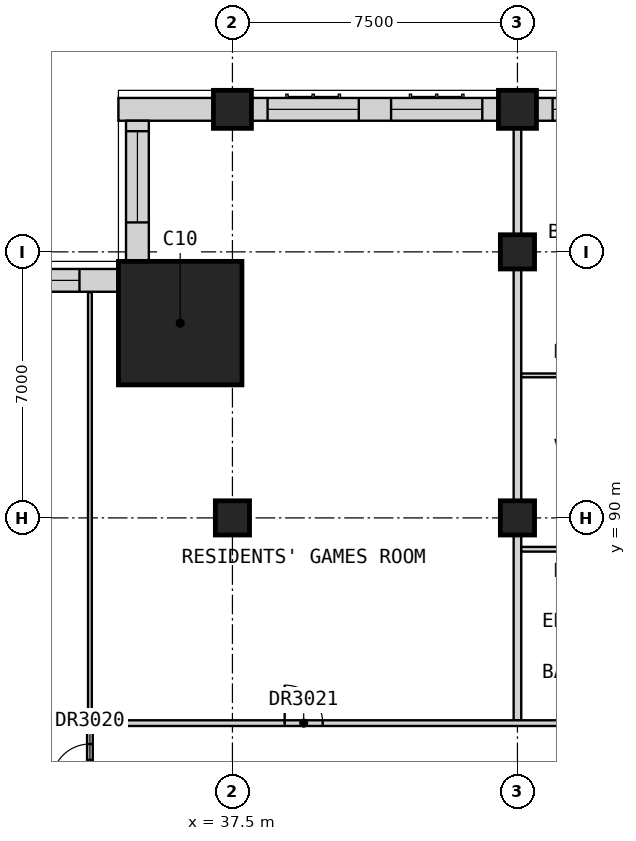
"""IFC4 building model, lengths in metres.
Left out: names, types, materials, properties, quantities, classifications, styles, units other than length and angle.
Written with IfcOpenShell. Run it as: python <this file> out.ifc"""

import sys

from ifc_helpers import new_model, si_unit, direction, frame, frame_2d, origin, origin_2d, place, context, subcontext, project, spatial, rectangle, extrude, element, fill, save


model = new_model("IFC4")
c1 = context("Model", 3, precision=1e-05, world=origin(), true_north=direction((0.0, 1.0)))
c2 = subcontext(c1, "Body", "Model", "MODEL_VIEW")
j1 = project(units=[si_unit("LENGTHUNIT", "METRE"), si_unit("PLANEANGLEUNIT", "RADIAN")], contexts=[c1])
p1 = place(None, origin())
s1 = spatial("IfcSite", under=j1, at=p1, CompositionType="ELEMENT")
p2 = place(p1, origin())
s2 = spatial("IfcBuilding", under=s1, at=p2, CompositionType="ELEMENT")
p3 = place(p2, frame((0.0, 0.0, 186.2)))
s3 = spatial("IfcBuildingStorey", under=s2, at=p3, CompositionType="ELEMENT", Elevation=186.2)
for number, where, z_axis, x_axis in (
    (1, (37.5, 100.75, 0.0), (0.0, 0.0, 1.0), (1.0, 0.0, 0.0)),
    (2, (45.0, 100.75, 0.0), (0.0, 0.0, 1.0), (1.0, 0.0, 0.0)),
):
    element("IfcColumn", number, at=place(p3, frame(where, z_axis=z_axis, x_axis=x_axis)), inside=s3, PredefinedType="COLUMN", context=c2, shape_type="SweptSolid", body=[
        extrude(rectangle(XDim=1.0, YDim=1.0, at=origin_2d()), origin(), (0.0, 0.0, 1.0), 3.5),
    ])
for number, where, z_axis, x_axis in (
    (3, (37.5, 90.0, 0.0), (0.0, 0.0, 1.0), (1.0, 0.0, 0.0)),
    (4, (45.0, 90.0, 0.0), (0.0, 0.0, 1.0), (1.0, 0.0, 0.0)),
    (5, (45.0, 97.0, 0.0), (0.0, 0.0, 1.0), (1.0, 0.0, 0.0)),
):
    element("IfcColumn", number, at=place(p3, frame(where, z_axis=z_axis, x_axis=x_axis)), inside=s3, PredefinedType="COLUMN", context=c2, shape_type="SweptSolid", body=[
        extrude(rectangle(XDim=0.9, YDim=0.9, at=origin_2d()), origin(), (0.0, 0.0, 1.0), 3.5),
    ])
p4 = place(p3, frame((36.125, 95.125, 0.0), z_axis=(0.0, 0.0, 1.0), x_axis=(1.0, 0.0, 0.0)))
e6 = element("IfcColumn", 6, at=p4, inside=s3, PredefinedType="COLUMN", context=c2, shape_type="SweptSolid", body=[
    extrude(rectangle(XDim=3.25, YDim=3.25, at=origin_2d()), origin(), (0.0, 0.0, 1.0), 3.5),
])
p5 = place(p3, frame((52.0, 100.75, 0.0), z_axis=(0.0, 0.0, 1.0), x_axis=(-1.0, 0.0, 0.0)))
e7 = element("IfcWall", 7, at=p5, inside=s3, PredefinedType="SOLIDWALL", context=c2, shape_type="SweptSolid", body=[
    extrude(rectangle(XDim=6.5, YDim=0.6, at=frame_2d((3.25, 0.0))), origin(), (0.0, 0.0, 1.0), 2.75),
])
p6 = place(p5, frame((3.675, 0.0, 0.8)))
e8 = element("IfcOpeningElement", 8, at=p6, cuts=e7, PredefinedType="OPENING", context=c2, shape_type="SweptSolid", body=[
    extrude(rectangle(XDim=2.4, YDim=1.8, at=frame_2d((1.2, 0.9))), frame((0.0, 0.31, 0.0), z_axis=(0.0, -1.0, 0.0), x_axis=(1.0, 0.0, 0.0)), (0.0, 0.0, 1.0), 0.62),
])
p7 = place(p5, frame((0.425, 0.0, 0.8)))
e9 = element("IfcOpeningElement", 9, at=p7, cuts=e7, PredefinedType="OPENING", context=c2, shape_type="SweptSolid", body=[
    extrude(rectangle(XDim=2.4, YDim=1.8, at=frame_2d((1.2, 0.9))), frame((0.0, 0.31, 0.0), z_axis=(0.0, -1.0, 0.0), x_axis=(1.0, 0.0, 0.0)), (0.0, 0.0, 1.0), 0.62),
])
p8 = place(p3, frame((44.5, 100.75, 0.0), z_axis=(0.0, 0.0, 1.0), x_axis=(-1.0, 0.0, 0.0)))
e10 = element("IfcWall", 10, at=p8, inside=s3, PredefinedType="SOLIDWALL", context=c2, shape_type="SweptSolid", body=[
    extrude(rectangle(XDim=6.5, YDim=0.6, at=frame_2d((3.25, 0.0))), origin(), (0.0, 0.0, 1.0), 2.75),
])
p9 = place(p8, frame((3.675, 0.0, 0.8)))
e11 = element("IfcOpeningElement", 11, at=p9, cuts=e10, PredefinedType="OPENING", context=c2, shape_type="SweptSolid", body=[
    extrude(rectangle(XDim=2.4, YDim=1.8, at=frame_2d((1.2, 0.9))), frame((0.0, 0.31, 0.0), z_axis=(0.0, -1.0, 0.0), x_axis=(1.0, 0.0, 0.0)), (0.0, 0.0, 1.0), 0.62),
])
p10 = place(p8, frame((0.425, 0.0, 0.8)))
e12 = element("IfcOpeningElement", 12, at=p10, cuts=e10, PredefinedType="OPENING", context=c2, shape_type="SweptSolid", body=[
    extrude(rectangle(XDim=2.4, YDim=1.8, at=frame_2d((1.2, 0.9))), frame((0.0, 0.31, 0.0), z_axis=(0.0, -1.0, 0.0), x_axis=(1.0, 0.0, 0.0)), (0.0, 0.0, 1.0), 0.62),
])
p11 = place(p3, frame((37.0, 100.75, 0.0), z_axis=(0.0, 0.0, 1.0), x_axis=(-1.0, 0.0, 0.0)))
e13 = element("IfcWall", 13, at=p11, inside=s3, PredefinedType="SOLIDWALL", context=c2, shape_type="SweptSolid", body=[
    extrude(rectangle(XDim=2.5, YDim=0.6, at=frame_2d((1.25, 0.0))), origin(), (0.0, 0.0, 1.0), 3.25),
])
p12 = place(p3, frame((35.0, 100.45, 0.0), z_axis=(0.0, 0.0, 1.0), x_axis=(0.0, -1.0, 0.0)))
e14 = element("IfcWall", 14, at=p12, inside=s3, PredefinedType="SOLIDWALL", context=c2, shape_type="SweptSolid", body=[
    extrude(rectangle(XDim=3.7, YDim=0.6, at=frame_2d((1.85, 0.0))), origin(), (0.0, 0.0, 1.0), 3.25),
])
p13 = place(p12, frame((0.275, 0.0, 0.8)))
e15 = element("IfcOpeningElement", 15, at=p13, cuts=e14, PredefinedType="OPENING", context=c2, shape_type="SweptSolid", body=[
    extrude(rectangle(XDim=2.4, YDim=1.8, at=frame_2d((1.2, 0.9))), frame((0.0, 0.31, 0.0), z_axis=(0.0, -1.0, 0.0), x_axis=(1.0, 0.0, 0.0)), (0.0, 0.0, 1.0), 0.62),
])
p14 = place(p3, frame((34.5, 96.25, 0.0), z_axis=(0.0, 0.0, 1.0), x_axis=(-1.0, 0.0, 0.0)))
e16 = element("IfcWall", 16, at=p14, inside=s3, PredefinedType="SOLIDWALL", context=c2, shape_type="SweptSolid", body=[
    extrude(rectangle(XDim=3.7, YDim=0.6, at=frame_2d((1.85, 0.0))), origin(), (0.0, 0.0, 1.0), 3.25),
])
p15 = place(p14, frame((1.025, 0.0, 0.8)))
e17 = element("IfcOpeningElement", 17, at=p15, cuts=e16, PredefinedType="OPENING", context=c2, shape_type="SweptSolid", body=[
    extrude(rectangle(XDim=2.4, YDim=1.8, at=frame_2d((1.2, 0.9))), frame((0.0, 0.31, 0.0), z_axis=(0.0, -1.0, 0.0), x_axis=(1.0, 0.0, 0.0)), (0.0, 0.0, 1.0), 0.62),
])
p16 = place(p3, frame((45.0, 84.675, 0.0), z_axis=(0.0, 0.0, 1.0), x_axis=(0.0, 1.0, 0.0)))
e18 = element("IfcWall", 18, at=p16, inside=s3, PredefinedType="PARTITIONING", context=c2, shape_type="SweptSolid", body=[
    extrude(rectangle(XDim=16.575, YDim=0.2, at=frame_2d((8.288, 0.0))), origin(), (0.0, 0.0, 1.0), 3.25),
])
p17 = place(p3, frame((33.75, 84.6, 0.0), z_axis=(0.0, 0.0, 1.0), x_axis=(1.0, 0.0, 0.0)))
e19 = element("IfcWall", 19, at=p17, inside=s3, PredefinedType="PARTITIONING", context=c2, shape_type="SweptSolid", body=[
    extrude(rectangle(XDim=28.35, YDim=0.15, at=frame_2d((14.175, 0.0))), origin(), (0.0, 0.0, 1.0), 3.25),
])
p18 = place(p17, frame((5.125, 0.0, 0.0)))
e20 = element("IfcOpeningElement", 20, at=p18, cuts=e19, PredefinedType="OPENING", context=c2, shape_type="SweptSolid", body=[
    extrude(rectangle(XDim=1.0, YDim=2.1, at=frame_2d((0.5, 1.05))), frame((0.0, 0.085, 0.0), z_axis=(0.0, -1.0, 0.0), x_axis=(1.0, 0.0, 0.0)), (0.0, 0.0, 1.0), 0.17),
])
p19 = place(p17, frame((16.425, 0.0, 0.0)))
e21 = element("IfcOpeningElement", 21, at=p19, cuts=e19, PredefinedType="OPENING", context=c2, shape_type="SweptSolid", body=[
    extrude(rectangle(XDim=0.9, YDim=2.1, at=frame_2d((0.45, 1.05))), frame((0.0, 0.085, 0.0), z_axis=(0.0, -1.0, 0.0), x_axis=(1.0, 0.0, 0.0)), (0.0, 0.0, 1.0), 0.17),
])
p20 = place(p3, frame((33.75, 82.5, 0.0), z_axis=(0.0, 0.0, 1.0), x_axis=(0.0, 1.0, 0.0)))
e22 = element("IfcWall", 22, at=p20, inside=s3, PredefinedType="PARTITIONING", context=c2, shape_type="SweptSolid", body=[
    extrude(rectangle(XDim=2.025, YDim=0.15, at=frame_2d((1.012, 0.0))), origin(), (0.0, 0.0, 1.0), 3.25),
])
p21 = place(p20, frame((0.55, 0.0, 0.0)))
e23 = element("IfcOpeningElement", 23, at=p21, cuts=e22, PredefinedType="OPENING", context=c2, shape_type="SweptSolid", body=[
    extrude(rectangle(XDim=1.0, YDim=2.1, at=frame_2d((0.5, 1.05))), frame((0.0, 0.085, 0.0), z_axis=(0.0, -1.0, 0.0), x_axis=(1.0, 0.0, 0.0)), (0.0, 0.0, 1.0), 0.17),
])
p22 = place(p3, frame((45.1, 93.75, 0.0), z_axis=(0.0, 0.0, 1.0), x_axis=(1.0, 0.0, 0.0)))
e24 = element("IfcWall", 24, at=p22, inside=s3, PredefinedType="PARTITIONING", context=c2, shape_type="SweptSolid", body=[
    extrude(rectangle(XDim=14.8, YDim=0.1, at=frame_2d((7.4, 0.0))), origin(), (0.0, 0.0, 1.0), 3.25),
])
p23 = place(p22, frame((1.325, 0.0, 0.0)))
e25 = element("IfcOpeningElement", 25, at=p23, cuts=e24, PredefinedType="OPENING", context=c2, shape_type="SweptSolid", body=[
    extrude(rectangle(XDim=0.9, YDim=2.1, at=frame_2d((0.45, 1.05))), frame((0.0, 0.06, 0.0), z_axis=(0.0, -1.0, 0.0), x_axis=(1.0, 0.0, 0.0)), (0.0, 0.0, 1.0), 0.12),
])
p24 = place(p22, frame((5.075, 0.0, 0.0)))
e26 = element("IfcOpeningElement", 26, at=p24, cuts=e24, PredefinedType="OPENING", context=c2, shape_type="SweptSolid", body=[
    extrude(rectangle(XDim=0.9, YDim=2.1, at=frame_2d((0.45, 1.05))), frame((0.0, 0.06, 0.0), z_axis=(0.0, -1.0, 0.0), x_axis=(1.0, 0.0, 0.0)), (0.0, 0.0, 1.0), 0.12),
])
p25 = place(p22, frame((12.575, 0.0, 0.0)))
e27 = element("IfcOpeningElement", 27, at=p25, cuts=e24, PredefinedType="OPENING", context=c2, shape_type="SweptSolid", body=[
    extrude(rectangle(XDim=0.9, YDim=2.1, at=frame_2d((0.45, 1.05))), frame((0.0, 0.06, 0.0), z_axis=(0.0, -1.0, 0.0), x_axis=(1.0, 0.0, 0.0)), (0.0, 0.0, 1.0), 0.12),
])
p26 = place(p3, frame((33.75, 84.675, 0.0), z_axis=(0.0, 0.0, 1.0), x_axis=(0.0, 1.0, 0.0)))
e28 = element("IfcWall", 28, at=p26, inside=s3, PredefinedType="PARTITIONING", context=c2, shape_type="SweptSolid", body=[
    extrude(rectangle(XDim=11.265, YDim=0.1, at=frame_2d((5.632, 0.0))), origin(), (0.0, 0.0, 1.0), 3.25),
])
p27 = place(p3, frame((45.1, 89.175, 0.0), z_axis=(0.0, 0.0, 1.0), x_axis=(1.0, 0.0, 0.0)))
e29 = element("IfcWall", 29, at=p27, inside=s3, PredefinedType="PARTITIONING", context=c2, shape_type="SweptSolid", body=[
    extrude(rectangle(XDim=3.65, YDim=0.125, at=frame_2d((1.825, 0.0))), origin(), (0.0, 0.0, 1.0), 3.25),
])
p28 = place(p27, frame((1.325, 0.0, 0.0)))
e30 = element("IfcOpeningElement", 30, at=p28, cuts=e29, PredefinedType="OPENING", context=c2, shape_type="SweptSolid", body=[
    extrude(rectangle(XDim=0.9, YDim=2.1, at=frame_2d((0.45, 1.05))), frame((0.0, 0.073, 0.0), z_axis=(0.0, -1.0, 0.0), x_axis=(1.0, 0.0, 0.0)), (0.0, 0.0, 1.0), 0.145),
])
p29 = place(p6, origin())
e31 = element("IfcWindow", 31, at=p29, inside=s3, PartitioningType="SINGLE_PANEL", PredefinedType="WINDOW", context=c2, shape_type="SweptSolid", body=[
    extrude(rectangle(XDim=2.4, YDim=1.8, at=frame_2d((1.2, 0.9))), frame((0.0, -0.07, 0.0), z_axis=(0.0, -1.0, 0.0), x_axis=(1.0, 0.0, 0.0)), (0.0, 0.0, 1.0), 0.06),
])
fill(e8, e31)
p30 = place(p9, origin())
e32 = element("IfcWindow", 32, at=p30, inside=s3, PartitioningType="SINGLE_PANEL", PredefinedType="WINDOW", context=c2, shape_type="SweptSolid", body=[
    extrude(rectangle(XDim=2.4, YDim=1.8, at=frame_2d((1.2, 0.9))), frame((0.0, -0.07, 0.0), z_axis=(0.0, -1.0, 0.0), x_axis=(1.0, 0.0, 0.0)), (0.0, 0.0, 1.0), 0.06),
])
fill(e11, e32)
p31 = place(p10, origin())
e33 = element("IfcWindow", 33, at=p31, inside=s3, PartitioningType="SINGLE_PANEL", PredefinedType="WINDOW", context=c2, shape_type="SweptSolid", body=[
    extrude(rectangle(XDim=2.4, YDim=1.8, at=frame_2d((1.2, 0.9))), frame((0.0, -0.07, 0.0), z_axis=(0.0, -1.0, 0.0), x_axis=(1.0, 0.0, 0.0)), (0.0, 0.0, 1.0), 0.06),
])
fill(e12, e33)
p32 = place(p13, origin())
e34 = element("IfcWindow", 34, at=p32, inside=s3, PartitioningType="SINGLE_PANEL", PredefinedType="WINDOW", context=c2, shape_type="SweptSolid", body=[
    extrude(rectangle(XDim=2.4, YDim=1.8, at=frame_2d((1.2, 0.9))), frame((0.0, -0.07, 0.0), z_axis=(0.0, -1.0, 0.0), x_axis=(1.0, 0.0, 0.0)), (0.0, 0.0, 1.0), 0.06),
])
fill(e15, e34)
p33 = place(p15, origin())
e35 = element("IfcWindow", 35, at=p33, inside=s3, PartitioningType="SINGLE_PANEL", PredefinedType="WINDOW", context=c2, shape_type="SweptSolid", body=[
    extrude(rectangle(XDim=2.4, YDim=1.8, at=frame_2d((1.2, 0.9))), frame((0.0, -0.07, 0.0), z_axis=(0.0, -1.0, 0.0), x_axis=(1.0, 0.0, 0.0)), (0.0, 0.0, 1.0), 0.06),
])
fill(e17, e35)
p34 = place(p21, origin())
e36 = element("IfcDoor", 36, at=p34, inside=s3, OperationType="SINGLE_SWING_LEFT", PredefinedType="DOOR", context=c2, shape_type="SweptSolid", body=[
    extrude(rectangle(XDim=1.0, YDim=2.1, at=frame_2d((0.5, 1.05))), frame((0.0, 0.025, 0.0), z_axis=(0.0, -1.0, 0.0), x_axis=(1.0, 0.0, 0.0)), (0.0, 0.0, 1.0), 0.05),
])
fill(e23, e36)
p35 = place(p18, origin())
e37 = element("IfcDoor", 37, at=p35, inside=s3, OperationType="SINGLE_SWING_LEFT", PredefinedType="DOOR", context=c2, shape_type="SweptSolid", body=[
    extrude(rectangle(XDim=1.0, YDim=2.1, at=frame_2d((0.5, 1.05))), frame((0.0, 0.025, 0.0), z_axis=(0.0, -1.0, 0.0), x_axis=(1.0, 0.0, 0.0)), (0.0, 0.0, 1.0), 0.05),
])
fill(e20, e37)
save(model, sys.argv[1])
